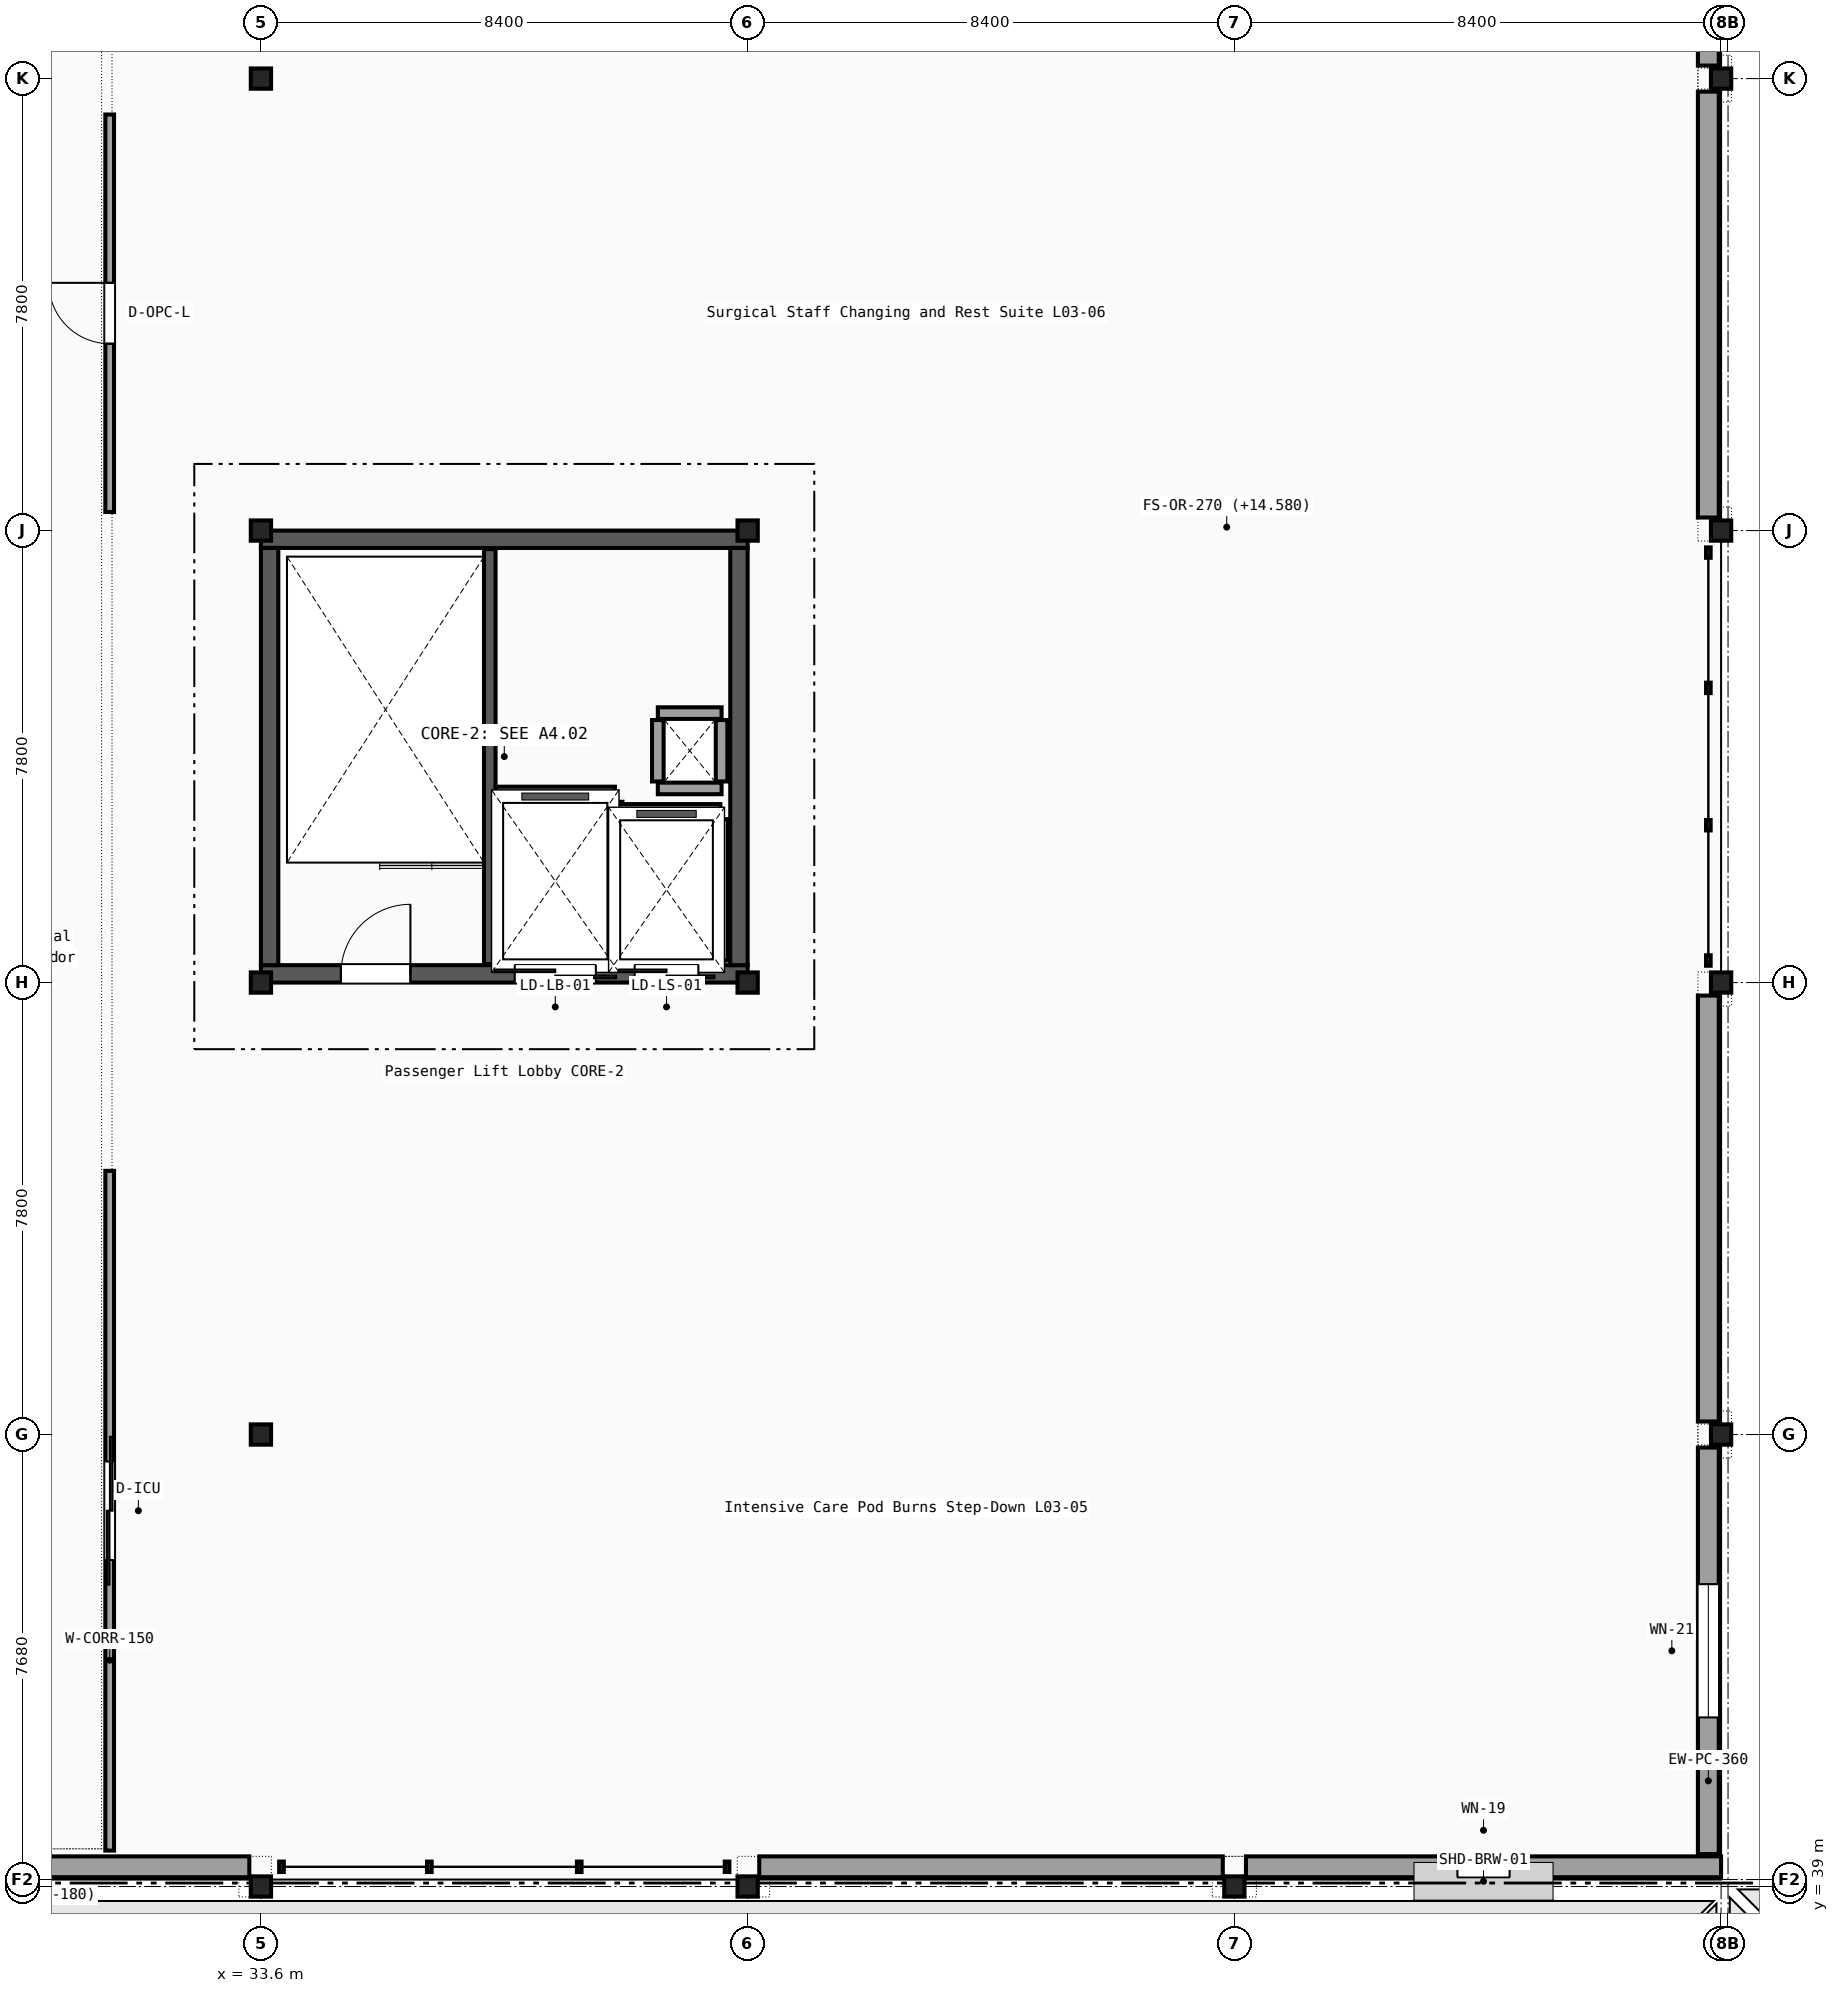
"""IFC4 building model, lengths in metres.
Left out: names, types, materials, properties, quantities, classifications, styles, units other than length and angle.
Written with IfcOpenShell. Run it as: python <this file> out.ifc"""

import sys

from ifc_helpers import new_model, si_unit, direction, frame, frame_2d, origin, origin_2d, place, context, subcontext, project, spatial, rectangle, i_section, extrude, element, fill, save


model = new_model("IFC4")
c1 = context("Model", 3, precision=1e-05, world=origin(), true_north=direction((0.0, 1.0)))
c2 = subcontext(c1, "Body", "Model", "MODEL_VIEW")
j1 = project(units=[si_unit("LENGTHUNIT", "METRE"), si_unit("PLANEANGLEUNIT", "RADIAN")], contexts=[c1])
p1 = place(None, origin())
s1 = spatial("IfcSite", under=j1, at=p1, CompositionType="ELEMENT")
p2 = place(p1, origin())
s2 = spatial("IfcBuilding", under=s1, at=p2, CompositionType="ELEMENT")
p3 = place(p2, frame((0.0, 0.0, 14.85)))
s3 = spatial("IfcBuildingStorey", under=s2, at=p3, CompositionType="ELEMENT", Elevation=14.85)
for number, where, z_axis, x_axis in (
    (1, (33.6, 39.0, 0.0), (0.0, 0.0, 1.0), (1.0, 0.0, 0.0)),
    (2, (33.6, 46.8, 0.0), (0.0, 0.0, 1.0), (1.0, 0.0, 0.0)),
    (3, (33.6, 54.6, 0.0), (0.0, 0.0, 1.0), (1.0, 0.0, 0.0)),
    (4, (33.6, 62.4, 0.0), (0.0, 0.0, 1.0), (1.0, 0.0, 0.0)),
    (5, (33.6, 70.2, 0.0), (0.0, 0.0, 1.0), (1.0, 0.0, 0.0)),
    (6, (42.0, 39.0, 0.0), (0.0, 0.0, 1.0), (1.0, 0.0, 0.0)),
    (7, (42.0, 54.6, 0.0), (0.0, 0.0, 1.0), (1.0, 0.0, 0.0)),
    (8, (42.0, 62.4, 0.0), (0.0, 0.0, 1.0), (1.0, 0.0, 0.0)),
    (9, (50.4, 39.0, 0.0), (0.0, 0.0, 1.0), (1.0, 0.0, 0.0)),
    (10, (58.8, 46.8, 0.0), (0.0, 0.0, 1.0), (1.0, 0.0, 0.0)),
    (11, (58.8, 54.6, 0.0), (0.0, 0.0, 1.0), (1.0, 0.0, 0.0)),
    (12, (58.8, 62.4, 0.0), (0.0, 0.0, 1.0), (1.0, 0.0, 0.0)),
    (13, (58.8, 70.2, 0.0), (0.0, 0.0, 1.0), (1.0, 0.0, 0.0)),
):
    element("IfcColumn", number, at=place(p3, frame(where, z_axis=z_axis, x_axis=x_axis)), inside=s3, PredefinedType="COLUMN", context=c2, shape_type="SweptSolid", body=[
        extrude(i_section(OverallWidth=0.3, OverallDepth=0.35, WebThickness=0.01, FlangeThickness=0.018, FilletRadius=0.027, at=origin_2d()), origin(), (0.0, 0.0, 1.0), 4.05),
    ])
for number, where, z_axis, x_axis in (
    (14, (25.4, 39.34, 0.0), (0.0, 0.0, 1.0), (1.0, 0.0, 0.0)),
    (15, (42.2, 39.34, 0.0), (0.0, 0.0, 1.0), (1.0, 0.0, 0.0)),
):
    element("IfcWall", number, at=place(p3, frame(where, z_axis=z_axis, x_axis=x_axis)), inside=s3, PredefinedType="SOLIDWALL", context=c2, shape_type="SweptSolid", body=[
        extrude(rectangle(XDim=8.0, YDim=0.36, at=frame_2d((4.0, 0.0))), origin(), (0.0, 0.0, 1.0), 3.77),
    ])
p4 = place(p3, frame((50.6, 39.34, 0.0), z_axis=(0.0, 0.0, 1.0), x_axis=(1.0, 0.0, 0.0)))
e16 = element("IfcWall", 16, at=p4, inside=s3, PredefinedType="SOLIDWALL", context=c2, shape_type="SweptSolid", body=[
    extrude(rectangle(XDim=8.2, YDim=0.36, at=frame_2d((4.1, 0.0))), origin(), (0.0, 0.0, 1.0), 3.77),
])
p5 = place(p4, frame((3.65, 0.0, 0.9)))
e17 = element("IfcOpeningElement", 17, at=p5, cuts=e16, PredefinedType="OPENING", context=c2, shape_type="SweptSolid", body=[
    extrude(rectangle(XDim=0.9, YDim=1.8, at=frame_2d((0.45, 0.9))), frame((0.0, 0.19, 0.0), z_axis=(0.0, -1.0, 0.0), x_axis=(1.0, 0.0, 0.0)), (0.0, 0.0, 1.0), 0.38),
])
p6 = place(p3, frame((58.58, 39.56, 0.0), z_axis=(0.0, 0.0, 1.0), x_axis=(0.0, 1.0, 0.0)))
e18 = element("IfcWall", 18, at=p6, inside=s3, PredefinedType="SOLIDWALL", context=c2, shape_type="SweptSolid", body=[
    extrude(rectangle(XDim=7.015, YDim=0.36, at=frame_2d((3.507, 0.0))), origin(), (0.0, 0.0, 1.0), 3.77),
])
p7 = place(p6, frame((2.357, 0.0, 0.95)))
e19 = element("IfcOpeningElement", 19, at=p7, cuts=e18, PredefinedType="OPENING", context=c2, shape_type="SweptSolid", body=[
    extrude(rectangle(XDim=2.3, YDim=1.55, at=frame_2d((1.15, 0.775))), frame((0.0, 0.19, 0.0), z_axis=(0.0, -1.0, 0.0), x_axis=(1.0, 0.0, 0.0)), (0.0, 0.0, 1.0), 0.38),
])
for number, where, z_axis, x_axis in (
    (20, (58.58, 47.025, 0.0), (0.0, 0.0, 1.0), (0.0, 1.0, 0.0)),
    (21, (58.58, 62.625, 0.0), (0.0, 0.0, 1.0), (0.0, 1.0, 0.0)),
):
    element("IfcWall", number, at=place(p3, frame(where, z_axis=z_axis, x_axis=x_axis)), inside=s3, PredefinedType="SOLIDWALL", context=c2, shape_type="SweptSolid", body=[
        extrude(rectangle(XDim=7.35, YDim=0.36, at=frame_2d((3.675, 0.0))), origin(), (0.0, 0.0, 1.0), 3.44),
    ])
p8 = place(p3, frame((58.58, 70.425, 0.0), z_axis=(0.0, 0.0, 1.0), x_axis=(0.0, 1.0, 0.0)))
e22 = element("IfcWall", 22, at=p8, inside=s3, PredefinedType="SOLIDWALL", context=c2, shape_type="SweptSolid", body=[
    extrude(rectangle(XDim=7.35, YDim=0.36, at=frame_2d((3.675, 0.0))), origin(), (0.0, 0.0, 1.0), 3.44),
])
p9 = place(p8, frame((2.375, 0.0, 0.65)))
e23 = element("IfcOpeningElement", 23, at=p9, cuts=e22, PredefinedType="OPENING", context=c2, shape_type="SweptSolid", body=[
    extrude(rectangle(XDim=2.6, YDim=2.0, at=frame_2d((1.3, 1.0))), frame((0.0, 0.19, 0.0), z_axis=(0.0, -1.0, 0.0), x_axis=(1.0, 0.0, 0.0)), (0.0, 0.0, 1.0), 0.38),
])
p10 = place(p3, frame((33.6, 54.75, 0.0), z_axis=(0.0, 0.0, 1.0), x_axis=(1.0, 0.0, 0.0)))
e24 = element("IfcWall", 24, at=p10, inside=s3, PredefinedType="SHEAR", context=c2, shape_type="SweptSolid", body=[
    extrude(rectangle(XDim=8.4, YDim=0.3, at=frame_2d((4.2, 0.0))), origin(), (0.0, 0.0, 1.0), 3.8),
])
p11 = place(p10, frame((1.38, 0.0, 0.0)))
e25 = element("IfcOpeningElement", 25, at=p11, cuts=e24, PredefinedType="OPENING", context=c2, shape_type="SweptSolid", body=[
    extrude(rectangle(XDim=1.2, YDim=2.15, at=frame_2d((0.6, 1.075))), frame((0.0, 0.16, 0.0), z_axis=(0.0, -1.0, 0.0), x_axis=(1.0, 0.0, 0.0)), (0.0, 0.0, 1.0), 0.32),
])
p12 = place(p10, frame((4.38, 0.0, 0.0)))
e26 = element("IfcOpeningElement", 26, at=p12, cuts=e24, PredefinedType="OPENING", context=c2, shape_type="SweptSolid", body=[
    extrude(rectangle(XDim=1.4, YDim=2.2, at=frame_2d((0.7, 1.1))), frame((0.0, 0.16, 0.0), z_axis=(0.0, -1.0, 0.0), x_axis=(1.0, 0.0, 0.0)), (0.0, 0.0, 1.0), 0.32),
])
p13 = place(p10, frame((6.45, 0.0, 0.0)))
e27 = element("IfcOpeningElement", 27, at=p13, cuts=e24, PredefinedType="OPENING", context=c2, shape_type="SweptSolid", body=[
    extrude(rectangle(XDim=1.1, YDim=2.15, at=frame_2d((0.55, 1.075))), frame((0.0, 0.16, 0.0), z_axis=(0.0, -1.0, 0.0), x_axis=(1.0, 0.0, 0.0)), (0.0, 0.0, 1.0), 0.32),
])
p14 = place(p3, frame((33.6, 62.25, 0.0), z_axis=(0.0, 0.0, 1.0), x_axis=(1.0, 0.0, 0.0)))
e28 = element("IfcWall", 28, at=p14, inside=s3, PredefinedType="SHEAR", context=c2, shape_type="SweptSolid", body=[
    extrude(rectangle(XDim=8.4, YDim=0.3, at=frame_2d((4.2, 0.0))), origin(), (0.0, 0.0, 1.0), 3.8),
])
for number, where, z_axis, x_axis in (
    (29, (33.75, 54.9, 0.0), (0.0, 0.0, 1.0), (0.0, 1.0, 0.0)),
    (30, (41.85, 54.9, 0.0), (0.0, 0.0, 1.0), (0.0, 1.0, 0.0)),
):
    element("IfcWall", number, at=place(p3, frame(where, z_axis=z_axis, x_axis=x_axis)), inside=s3, PredefinedType="SHEAR", context=c2, shape_type="SweptSolid", body=[
        extrude(rectangle(XDim=7.2, YDim=0.3, at=frame_2d((3.6, 0.0))), origin(), (0.0, 0.0, 1.0), 3.8),
    ])
p15 = place(p3, frame((37.55, 54.92, 0.0), z_axis=(0.0, 0.0, 1.0), x_axis=(0.0, 1.0, 0.0)))
e31 = element("IfcWall", 31, at=p15, inside=s3, PredefinedType="SHEAR", context=c2, shape_type="SweptSolid", body=[
    extrude(rectangle(XDim=7.16, YDim=0.2, at=frame_2d((3.58, 0.0))), origin(), (0.0, 0.0, 1.0), 3.8),
])
for number, where, z_axis, x_axis in (
    (32, (40.45, 57.95, 0.0), (0.0, 0.0, 1.0), (1.0, 0.0, 0.0)),
    (33, (40.45, 59.25, 0.0), (0.0, 0.0, 1.0), (1.0, 0.0, 0.0)),
):
    element("IfcWall", number, at=place(p3, frame(where, z_axis=z_axis, x_axis=x_axis)), inside=s3, PredefinedType="PARTITIONING", context=c2, shape_type="SweptSolid", body=[
        extrude(rectangle(XDim=1.1, YDim=0.2, at=frame_2d((0.55, 0.0))), origin(), (0.0, 0.0, 1.0), 3.44),
    ])
for number, where, z_axis, x_axis in (
    (34, (40.45, 58.07, 0.0), (0.0, 0.0, 1.0), (0.0, 1.0, 0.0)),
    (35, (41.55, 58.07, 0.0), (0.0, 0.0, 1.0), (0.0, 1.0, 0.0)),
):
    element("IfcWall", number, at=place(p3, frame(where, z_axis=z_axis, x_axis=x_axis)), inside=s3, PredefinedType="PARTITIONING", context=c2, shape_type="SweptSolid", body=[
        extrude(rectangle(XDim=1.06, YDim=0.2, at=frame_2d((0.53, 0.0))), origin(), (0.0, 0.0, 1.0), 3.44),
    ])
p16 = place(p3, frame((39.74, 54.98, 0.0), z_axis=(0.0, 0.0, 1.0), x_axis=(0.0, 1.0, 0.0)))
e36 = element("IfcWall", 36, at=p16, inside=s3, PredefinedType="PARTITIONING", context=c2, shape_type="SweptSolid", body=[
    extrude(rectangle(XDim=2.74, YDim=0.2, at=frame_2d((1.37, 0.0))), origin(), (0.0, 0.0, 1.0), 3.44),
])
p17 = place(p3, frame((37.65, 57.88, 0.0), z_axis=(0.0, 0.0, 1.0), x_axis=(1.0, 0.0, 0.0)))
e37 = element("IfcWall", 37, at=p17, inside=s3, PredefinedType="PARTITIONING", context=c2, shape_type="SweptSolid", body=[
    extrude(rectangle(XDim=2.06, YDim=0.2, at=frame_2d((1.03, 0.0))), origin(), (0.0, 0.0, 1.0), 3.44),
])
p18 = place(p3, frame((41.56, 54.98, 0.0), z_axis=(0.0, 0.0, 1.0), x_axis=(0.0, 1.0, 0.0)))
e38 = element("IfcWall", 38, at=p18, inside=s3, PredefinedType="PARTITIONING", context=c2, shape_type="SweptSolid", body=[
    extrude(rectangle(XDim=2.44, YDim=0.2, at=frame_2d((1.22, 0.0))), origin(), (0.0, 0.0, 1.0), 3.44),
])
p19 = place(p3, frame((39.67, 57.58, 0.0), z_axis=(0.0, 0.0, 1.0), x_axis=(1.0, 0.0, 0.0)))
e39 = element("IfcWall", 39, at=p19, inside=s3, PredefinedType="PARTITIONING", context=c2, shape_type="SweptSolid", body=[
    extrude(rectangle(XDim=1.86, YDim=0.2, at=frame_2d((0.93, 0.0))), origin(), (0.0, 0.0, 1.0), 3.44),
])
p20 = place(p3, frame((30.99, 39.62, 0.0), z_axis=(0.0, 0.0, 1.0), x_axis=(0.0, 1.0, 0.0)))
e40 = element("IfcWall", 40, at=p20, inside=s3, PredefinedType="PARTITIONING", context=c2, shape_type="SweptSolid", body=[
    extrude(rectangle(XDim=11.73, YDim=0.15, at=frame_2d((5.865, 0.0))), origin(), (0.0, 0.0, 1.0), 3.77),
])
p21 = place(p20, frame((5.015, 0.0, 0.0)))
e41 = element("IfcOpeningElement", 41, at=p21, cuts=e40, PredefinedType="OPENING", context=c2, shape_type="SweptSolid", body=[
    extrude(rectangle(XDim=1.7, YDim=2.3, at=frame_2d((0.85, 1.15))), frame((0.0, 0.085, 0.0), z_axis=(0.0, -1.0, 0.0), x_axis=(1.0, 0.0, 0.0)), (0.0, 0.0, 1.0), 0.17),
])
p22 = place(p3, frame((30.99, 62.72, 0.0), z_axis=(0.0, 0.0, 1.0), x_axis=(0.0, 1.0, 0.0)))
e42 = element("IfcWall", 42, at=p22, inside=s3, PredefinedType="PARTITIONING", context=c2, shape_type="SweptSolid", body=[
    extrude(rectangle(XDim=6.86, YDim=0.15, at=frame_2d((3.43, 0.0))), origin(), (0.0, 0.0, 1.0), 3.44),
])
p23 = place(p22, frame((2.905, 0.0, 0.0)))
e43 = element("IfcOpeningElement", 43, at=p23, cuts=e42, PredefinedType="OPENING", context=c2, shape_type="SweptSolid", body=[
    extrude(rectangle(XDim=1.05, YDim=2.15, at=frame_2d((0.525, 1.075))), frame((0.0, 0.085, 0.0), z_axis=(0.0, -1.0, 0.0), x_axis=(1.0, 0.0, 0.0)), (0.0, 0.0, 1.0), 0.17),
])
p24 = place(p5, origin())
e44 = element("IfcWindow", 44, at=p24, inside=s3, PartitioningType="SINGLE_PANEL", PredefinedType="WINDOW", context=c2, shape_type="SweptSolid", body=[
    extrude(rectangle(XDim=0.9, YDim=1.8, at=frame_2d((0.45, 0.9))), frame((0.0, 0.03, 0.0), z_axis=(0.0, -1.0, 0.0), x_axis=(1.0, 0.0, 0.0)), (0.0, 0.0, 1.0), 0.06),
])
fill(e17, e44)
p25 = place(p7, origin())
e45 = element("IfcWindow", 45, at=p25, inside=s3, PartitioningType="SINGLE_PANEL", PredefinedType="WINDOW", context=c2, shape_type="SweptSolid", body=[
    extrude(rectangle(XDim=2.3, YDim=1.55, at=frame_2d((1.15, 0.775))), frame((0.0, 0.03, 0.0), z_axis=(0.0, -1.0, 0.0), x_axis=(1.0, 0.0, 0.0)), (0.0, 0.0, 1.0), 0.06),
])
fill(e19, e45)
p26 = place(p11, origin())
e46 = element("IfcDoor", 46, at=p26, inside=s3, OperationType="SINGLE_SWING_RIGHT", PredefinedType="DOOR", context=c2, shape_type="SweptSolid", body=[
    extrude(rectangle(XDim=1.2, YDim=2.15, at=frame_2d((0.6, 1.075))), frame((0.0, 0.025, 0.0), z_axis=(0.0, -1.0, 0.0), x_axis=(1.0, 0.0, 0.0)), (0.0, 0.0, 1.0), 0.05),
])
fill(e25, e46)
p27 = place(p12, origin())
e47 = element("IfcDoor", 47, at=p27, inside=s3, OperationType="DOUBLE_DOOR_SLIDING", PredefinedType="DOOR", context=c2, shape_type="SweptSolid", body=[
    extrude(rectangle(XDim=1.4, YDim=2.2, at=frame_2d((0.7, 1.1))), frame((0.0, 0.025, 0.0), z_axis=(0.0, -1.0, 0.0), x_axis=(1.0, 0.0, 0.0)), (0.0, 0.0, 1.0), 0.05),
])
fill(e26, e47)
p28 = place(p13, origin())
e48 = element("IfcDoor", 48, at=p28, inside=s3, OperationType="DOUBLE_DOOR_SLIDING", PredefinedType="DOOR", context=c2, shape_type="SweptSolid", body=[
    extrude(rectangle(XDim=1.1, YDim=2.15, at=frame_2d((0.55, 1.075))), frame((0.0, 0.025, 0.0), z_axis=(0.0, -1.0, 0.0), x_axis=(1.0, 0.0, 0.0)), (0.0, 0.0, 1.0), 0.05),
])
fill(e27, e48)
p29 = place(p21, origin())
e49 = element("IfcDoor", 49, at=p29, inside=s3, OperationType="DOUBLE_DOOR_SLIDING", PredefinedType="DOOR", context=c2, shape_type="SweptSolid", body=[
    extrude(rectangle(XDim=1.7, YDim=2.3, at=frame_2d((0.85, 1.15))), frame((0.0, 0.025, 0.0), z_axis=(0.0, -1.0, 0.0), x_axis=(1.0, 0.0, 0.0)), (0.0, 0.0, 1.0), 0.05),
])
fill(e41, e49)
p30 = place(p23, origin())
e50 = element("IfcDoor", 50, at=p30, inside=s3, OperationType="SINGLE_SWING_RIGHT", PredefinedType="DOOR", context=c2, shape_type="SweptSolid", body=[
    extrude(rectangle(XDim=1.05, YDim=2.15, at=frame_2d((0.525, 1.075))), frame((0.0, 0.025, 0.0), z_axis=(0.0, -1.0, 0.0), x_axis=(1.0, 0.0, 0.0)), (0.0, 0.0, 1.0), 0.05),
])
fill(e43, e50)
save(model, sys.argv[1])
